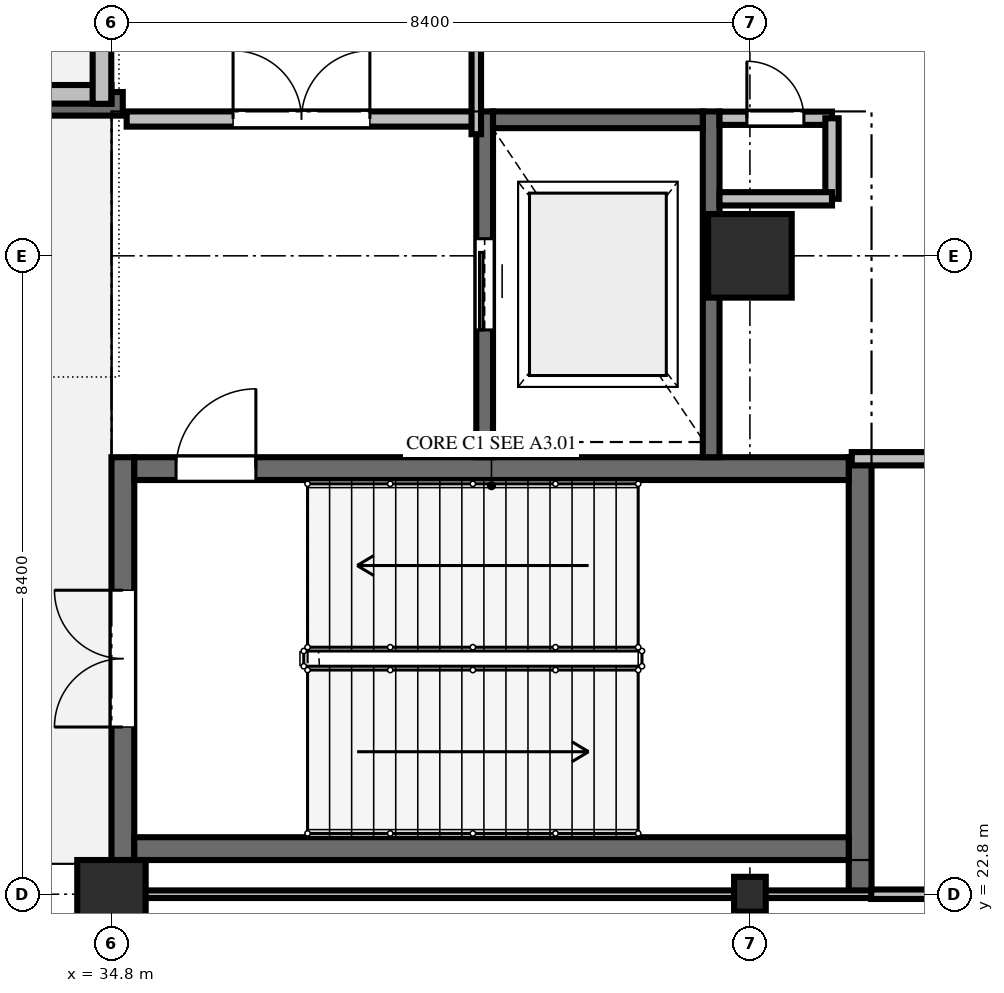
"""IFC4 building model, lengths in metres.
Left out: names, types, materials, properties, quantities, classifications, styles, units other than length and angle.
Written with IfcOpenShell. Run it as: python <this file> out.ifc"""

import sys

from ifc_helpers import new_model, si_unit, direction, frame, frame_2d, origin, origin_2d, place, context, subcontext, project, spatial, rectangle, hollow_rectangle, i_section, extrude, element, fill, save


model = new_model("IFC4")
c1 = context("Model", 3, precision=1e-05, world=origin(), true_north=direction((0.0, 1.0)))
c2 = subcontext(c1, "Body", "Model", "MODEL_VIEW")
j1 = project(units=[si_unit("LENGTHUNIT", "METRE"), si_unit("PLANEANGLEUNIT", "RADIAN")], contexts=[c1])
p1 = place(None, origin())
s1 = spatial("IfcSite", under=j1, at=p1, CompositionType="ELEMENT")
p2 = place(p1, origin())
s2 = spatial("IfcBuilding", under=s1, at=p2, CompositionType="ELEMENT")
p3 = place(p2, origin())
s3 = spatial("IfcBuildingStorey", under=s2, at=p3, CompositionType="ELEMENT", Elevation=0.0)
p4 = place(p3, frame((34.8, 22.8, 0.0), z_axis=(0.0, 0.0, 1.0), x_axis=(1.0, 0.0, 0.0)))
e1 = element("IfcColumn", 1, at=p4, inside=s3, PredefinedType="COLUMN", context=c2, shape_type="SweptSolid", body=[
    extrude(hollow_rectangle(XDim=0.9, YDim=0.9, WallThickness=0.036, InnerFilletRadius=0.036, OuterFilletRadius=0.072, at=origin_2d()), origin(), (0.0, 0.0, 1.0), 5.4),
])
p5 = place(p3, frame((43.2, 22.8, 0.0), z_axis=(0.0, 0.0, 1.0), x_axis=(1.0, 0.0, 0.0)))
e2 = element("IfcColumn", 2, at=p5, inside=s3, PredefinedType="COLUMN", context=c2, shape_type="SweptSolid", body=[
    extrude(i_section(OverallWidth=0.417, OverallDepth=0.458, WebThickness=0.03, FlangeThickness=0.04, FilletRadius=0.022, at=origin_2d()), origin(), (0.0, 0.0, 1.0), 5.4),
])
p6 = place(p3, frame((43.2, 31.2, 0.0), z_axis=(0.0, 0.0, 1.0), x_axis=(1.0, 0.0, 0.0)))
e3 = element("IfcColumn", 3, at=p6, inside=s3, PredefinedType="COLUMN", context=c2, shape_type="SweptSolid", body=[
    extrude(rectangle(XDim=1.1, YDim=1.1, at=origin_2d()), origin(), (0.0, 0.0, 1.0), 5.4),
])
p7 = place(p3, frame((34.949, 33.2, 0.0), z_axis=(0.0, 0.0, 1.0), x_axis=(-1.0, 0.0, 0.0)))
e4 = element("IfcWall", 4, at=p7, inside=s3, PredefinedType="SOLIDWALL", context=c2, shape_type="SweptSolid", body=[
    extrude(rectangle(XDim=6.928, YDim=0.31, at=frame_2d((3.464, 0.0))), origin(), (0.0, 0.0, 1.0), 2.838),
])
p8 = place(p3, frame((13.8, 33.325, 3.88), z_axis=(0.0, 0.0, 1.0), x_axis=(1.0, 0.0, 0.0)))
e5 = element("IfcWall", 5, at=p8, inside=s3, PredefinedType="PARAPET", context=c2, shape_type="SweptSolid", body=[
    extrude(rectangle(XDim=21.0, YDim=0.245, at=frame_2d((10.5, 0.0))), origin(), (0.0, 0.0, 1.0), 1.14),
])
p9 = place(p3, frame((34.675, 42.0, 3.88), z_axis=(0.0, 0.0, 1.0), x_axis=(0.0, -1.0, 0.0)))
e6 = element("IfcWall", 6, at=p9, inside=s3, PredefinedType="PARAPET", context=c2, shape_type="SweptSolid", body=[
    extrude(rectangle(XDim=8.8, YDim=0.245, at=frame_2d((4.4, 0.0))), origin(), (0.0, 0.0, 1.0), 1.14),
])
p10 = place(p3, frame((34.95, 23.25, 0.0), z_axis=(0.0, 0.0, 1.0), x_axis=(0.0, 1.0, 0.0)))
e7 = element("IfcWall", 7, at=p10, inside=s3, PredefinedType="SHEAR", context=c2, shape_type="SweptSolid", body=[
    extrude(rectangle(XDim=5.3, YDim=0.3, at=frame_2d((2.65, 0.0))), origin(), (0.0, 0.0, 1.0), 5.17),
])
p11 = place(p10, frame((1.75, 0.0, 0.0)))
e8 = element("IfcOpeningElement", 8, at=p11, cuts=e7, PredefinedType="OPENING", context=c2, shape_type="SweptSolid", body=[
    extrude(rectangle(XDim=1.8, YDim=2.25, at=frame_2d((0.9, 1.125))), frame((0.0, 0.16, 0.0), z_axis=(0.0, -1.0, 0.0), x_axis=(1.0, 0.0, 0.0)), (0.0, 0.0, 1.0), 0.32),
])
p12 = place(p3, frame((44.65, 28.55, 0.0), z_axis=(0.0, 0.0, 1.0), x_axis=(0.0, -1.0, 0.0)))
e9 = element("IfcWall", 9, at=p12, inside=s3, PredefinedType="SHEAR", context=c2, shape_type="SweptSolid", body=[
    extrude(rectangle(XDim=5.75, YDim=0.3, at=frame_2d((2.875, 0.0))), origin(), (0.0, 0.0, 1.0), 5.17),
])
p13 = place(p3, frame((44.5, 23.4, 0.0), z_axis=(0.0, 0.0, 1.0), x_axis=(-1.0, 0.0, 0.0)))
e10 = element("IfcWall", 10, at=p13, inside=s3, PredefinedType="SHEAR", context=c2, shape_type="SweptSolid", body=[
    extrude(rectangle(XDim=9.4, YDim=0.3, at=frame_2d((4.7, 0.0))), origin(), (0.0, 0.0, 1.0), 5.17),
])
p14 = place(p3, frame((35.1, 28.4, 0.0), z_axis=(0.0, 0.0, 1.0), x_axis=(1.0, 0.0, 0.0)))
e11 = element("IfcWall", 11, at=p14, inside=s3, PredefinedType="SHEAR", context=c2, shape_type="SweptSolid", body=[
    extrude(rectangle(XDim=9.4, YDim=0.3, at=frame_2d((4.7, 0.0))), origin(), (0.0, 0.0, 1.0), 5.17),
])
p15 = place(p14, frame((0.55, 0.0, 0.0)))
e12 = element("IfcOpeningElement", 12, at=p15, cuts=e11, PredefinedType="OPENING", context=c2, shape_type="SweptSolid", body=[
    extrude(rectangle(XDim=1.05, YDim=2.2, at=frame_2d((0.525, 1.1))), frame((0.0, 0.16, 0.0), z_axis=(0.0, -1.0, 0.0), x_axis=(1.0, 0.0, 0.0)), (0.0, 0.0, 1.0), 0.32),
])
p16 = place(p3, frame((35.0, 33.0, 0.0), z_axis=(0.0, 0.0, 1.0), x_axis=(1.0, 0.0, 0.0)))
e13 = element("IfcWall", 13, at=p16, inside=s3, PredefinedType="SOLIDWALL", context=c2, shape_type="SweptSolid", body=[
    extrude(rectangle(XDim=4.6, YDim=0.2, at=frame_2d((2.3, 0.0))), origin(), (0.0, 0.0, 1.0), 5.05),
])
p17 = place(p16, frame((1.4, 0.0, 0.0)))
e14 = element("IfcOpeningElement", 14, at=p17, cuts=e13, PredefinedType="OPENING", context=c2, shape_type="SweptSolid", body=[
    extrude(rectangle(XDim=1.8, YDim=2.2, at=frame_2d((0.9, 1.1))), frame((0.0, 0.11, 0.0), z_axis=(0.0, -1.0, 0.0), x_axis=(1.0, 0.0, 0.0)), (0.0, 0.0, 1.0), 0.22),
])
p18 = place(p3, frame((39.71, 28.55, 0.0), z_axis=(0.0, 0.0, 1.0), x_axis=(0.0, 1.0, 0.0)))
e15 = element("IfcWall", 15, at=p18, inside=s3, PredefinedType="SOLIDWALL", context=c2, shape_type="SweptSolid", body=[
    extrude(rectangle(XDim=4.55, YDim=0.22, at=frame_2d((2.275, 0.0))), origin(), (0.0, 0.0, 1.0), 5.17),
])
p19 = place(p18, frame((1.675, 0.0, 0.0)))
e16 = element("IfcOpeningElement", 16, at=p19, cuts=e15, PredefinedType="OPENING", context=c2, shape_type="SweptSolid", body=[
    extrude(rectangle(XDim=1.2, YDim=2.2, at=frame_2d((0.6, 1.1))), frame((0.0, 0.12, 0.0), z_axis=(0.0, -1.0, 0.0), x_axis=(1.0, 0.0, 0.0)), (0.0, 0.0, 1.0), 0.24),
])
p20 = place(p3, frame((42.69, 28.55, 0.0), z_axis=(0.0, 0.0, 1.0), x_axis=(0.0, 1.0, 0.0)))
e17 = element("IfcWall", 17, at=p20, inside=s3, PredefinedType="SOLIDWALL", context=c2, shape_type="SweptSolid", body=[
    extrude(rectangle(XDim=4.55, YDim=0.22, at=frame_2d((2.275, 0.0))), origin(), (0.0, 0.0, 1.0), 5.17),
])
p21 = place(p3, frame((39.82, 32.99, 0.0), z_axis=(0.0, 0.0, 1.0), x_axis=(1.0, 0.0, 0.0)))
e18 = element("IfcWall", 18, at=p21, inside=s3, PredefinedType="SOLIDWALL", context=c2, shape_type="SweptSolid", body=[
    extrude(rectangle(XDim=2.76, YDim=0.22, at=frame_2d((1.38, 0.0))), origin(), (0.0, 0.0, 1.0), 5.17),
])
p22 = place(p3, frame((42.8, 33.01, 0.0), z_axis=(0.0, 0.0, 1.0), x_axis=(1.0, 0.0, 0.0)))
e19 = element("IfcWall", 19, at=p22, inside=s3, PredefinedType="PLUMBINGWALL", context=c2, shape_type="SweptSolid", body=[
    extrude(rectangle(XDim=1.48, YDim=0.175, at=frame_2d((0.74, 0.0))), origin(), (0.0, 0.0, 1.0), 5.05),
])
p23 = place(p22, frame((0.36, 0.0, 0.0)))
e20 = element("IfcOpeningElement", 20, at=p23, cuts=e19, PredefinedType="OPENING", context=c2, shape_type="SweptSolid", body=[
    extrude(rectangle(XDim=0.75, YDim=2.05, at=frame_2d((0.375, 1.025))), frame((0.0, 0.097, 0.0), z_axis=(0.0, -1.0, 0.0), x_axis=(1.0, 0.0, 0.0)), (0.0, 0.0, 1.0), 0.195),
])
p24 = place(p3, frame((44.28, 31.95, 0.0), z_axis=(0.0, 0.0, 1.0), x_axis=(0.0, 1.0, 0.0)))
e21 = element("IfcWall", 21, at=p24, inside=s3, PredefinedType="PLUMBINGWALL", context=c2, shape_type="SweptSolid", body=[
    extrude(rectangle(XDim=1.06, YDim=0.175, at=frame_2d((0.53, 0.0))), origin(), (0.0, 0.0, 1.0), 5.05),
])
p25 = place(p3, frame((42.8, 31.95, 0.0), z_axis=(0.0, 0.0, 1.0), x_axis=(1.0, 0.0, 0.0)))
e22 = element("IfcWall", 22, at=p25, inside=s3, PredefinedType="PLUMBINGWALL", context=c2, shape_type="SweptSolid", body=[
    extrude(rectangle(XDim=1.48, YDim=0.175, at=frame_2d((0.74, 0.0))), origin(), (0.0, 0.0, 1.0), 5.05),
])
p26 = place(p3, frame((35.104, 22.8, 0.0), z_axis=(0.0, 0.0, 1.0), x_axis=(1.0, 0.0, 0.0)))
e23 = element("IfcWall", 23, at=p26, inside=s3, PredefinedType="PARTITIONING", context=c2, shape_type="SweptSolid", body=[
    extrude(rectangle(XDim=9.72, YDim=0.1, at=frame_2d((4.86, 0.0))), origin(), (0.0, 0.0, 1.0), 2.965),
])
p27 = place(p3, frame((44.796, 22.8, 0.0), z_axis=(0.0, 0.0, 1.0), x_axis=(1.0, 0.0, 0.0)))
e24 = element("IfcWall", 24, at=p27, inside=s3, PredefinedType="PARTITIONING", context=c2, shape_type="SweptSolid", body=[
    extrude(rectangle(XDim=13.264, YDim=0.125, at=frame_2d((6.632, 0.0))), origin(), (0.0, 0.0, 1.0), 2.965),
])
p28 = place(p3, frame((44.54, 28.53, 0.0), z_axis=(0.0, 0.0, 1.0), x_axis=(1.0, 0.0, 0.0)))
e25 = element("IfcWall", 25, at=p28, inside=s3, PredefinedType="PLUMBINGWALL", context=c2, shape_type="SweptSolid", body=[
    extrude(rectangle(XDim=13.64, YDim=0.175, at=frame_2d((6.82, 0.0))), origin(), (0.0, 0.0, 1.0), 4.67),
])
p29 = place(p28, frame((6.36, 0.0, 0.0)))
e26 = element("IfcOpeningElement", 26, at=p29, cuts=e25, PredefinedType="OPENING", context=c2, shape_type="SweptSolid", body=[
    extrude(rectangle(XDim=0.92, YDim=2.15, at=frame_2d((0.46, 1.075))), frame((0.0, 0.097, 0.0), z_axis=(0.0, -1.0, 0.0), x_axis=(1.0, 0.0, 0.0)), (0.0, 0.0, 1.0), 0.195),
])
p30 = place(p3, frame((39.6, 32.8, 0.0), z_axis=(0.0, 0.0, 1.0), x_axis=(0.0, 1.0, 0.0)))
e27 = element("IfcWall", 27, at=p30, inside=s3, PredefinedType="PARTITIONING", context=c2, shape_type="SweptSolid", body=[
    extrude(rectangle(XDim=4.0, YDim=0.125, at=frame_2d((2.0, 0.0))), origin(), (0.0, 0.0, 1.0), 5.05),
])
p31 = place(p11, origin())
e28 = element("IfcDoor", 28, at=p31, inside=s3, OperationType="DOUBLE_DOOR_SINGLE_SWING", PredefinedType="DOOR", context=c2, shape_type="SweptSolid", body=[
    extrude(rectangle(XDim=1.8, YDim=2.25, at=frame_2d((0.9, 1.125))), frame((0.0, 0.025, 0.0), z_axis=(0.0, -1.0, 0.0), x_axis=(1.0, 0.0, 0.0)), (0.0, 0.0, 1.0), 0.05),
])
fill(e8, e28)
p32 = place(p15, origin())
e29 = element("IfcDoor", 29, at=p32, inside=s3, OperationType="SINGLE_SWING_RIGHT", PredefinedType="DOOR", context=c2, shape_type="SweptSolid", body=[
    extrude(rectangle(XDim=1.05, YDim=2.2, at=frame_2d((0.525, 1.1))), frame((0.0, 0.025, 0.0), z_axis=(0.0, -1.0, 0.0), x_axis=(1.0, 0.0, 0.0)), (0.0, 0.0, 1.0), 0.05),
])
fill(e12, e29)
p33 = place(p17, origin())
e30 = element("IfcDoor", 30, at=p33, inside=s3, OperationType="DOUBLE_DOOR_SINGLE_SWING", PredefinedType="DOOR", context=c2, shape_type="SweptSolid", body=[
    extrude(rectangle(XDim=1.8, YDim=2.2, at=frame_2d((0.9, 1.1))), frame((0.0, 0.025, 0.0), z_axis=(0.0, -1.0, 0.0), x_axis=(1.0, 0.0, 0.0)), (0.0, 0.0, 1.0), 0.05),
])
fill(e14, e30)
p34 = place(p19, origin())
e31 = element("IfcDoor", 31, at=p34, inside=s3, OperationType="SLIDING_TO_LEFT", PredefinedType="DOOR", context=c2, shape_type="SweptSolid", body=[
    extrude(rectangle(XDim=1.2, YDim=2.2, at=frame_2d((0.6, 1.1))), frame((0.0, 0.025, 0.0), z_axis=(0.0, -1.0, 0.0), x_axis=(1.0, 0.0, 0.0)), (0.0, 0.0, 1.0), 0.05),
])
fill(e16, e31)
p35 = place(p23, origin())
e32 = element("IfcDoor", 32, at=p35, inside=s3, OperationType="SINGLE_SWING_LEFT", PredefinedType="DOOR", context=c2, shape_type="SweptSolid", body=[
    extrude(rectangle(XDim=0.75, YDim=2.05, at=frame_2d((0.375, 1.025))), frame((0.0, 0.025, 0.0), z_axis=(0.0, -1.0, 0.0), x_axis=(1.0, 0.0, 0.0)), (0.0, 0.0, 1.0), 0.05),
])
fill(e20, e32)
save(model, sys.argv[1])
